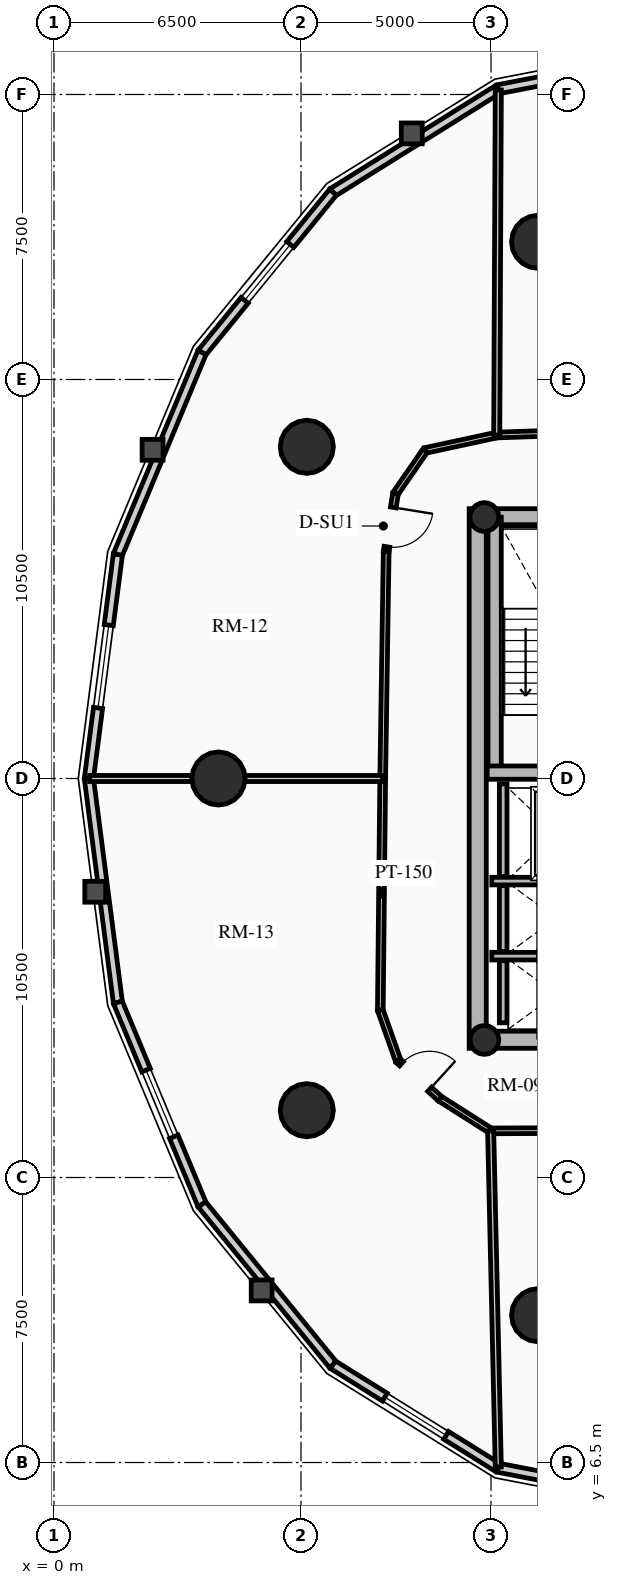
"""IFC4 building model, lengths in metres.
Left out: names, types, materials, properties, quantities, classifications, styles, units other than length and angle.
Written with IfcOpenShell. Run it as: python <this file> out.ifc"""

import sys

from ifc_helpers import new_model, si_unit, direction, frame, frame_2d, origin, origin_2d, place, context, subcontext, project, spatial, rectangle, circle, hollow_circle, extrude, source, transform, mapped, element, fill, save


model = new_model("IFC4")
c1 = context("Model", 3, precision=1e-05, world=origin(), true_north=direction((0.0, 1.0)))
c2 = subcontext(c1, "Body", "Model", "MODEL_VIEW")
j1 = project(units=[si_unit("LENGTHUNIT", "METRE"), si_unit("PLANEANGLEUNIT", "RADIAN")], contexts=[c1])
p1 = place(None, origin())
s1 = spatial("IfcSite", under=j1, at=p1, CompositionType="ELEMENT")
p2 = place(p1, origin())
s2 = spatial("IfcBuilding", under=s1, at=p2, CompositionType="ELEMENT")
p3 = place(p2, frame((0.0, 0.0, 132.88)))
s3 = spatial("IfcBuildingStorey", under=s2, at=p3, CompositionType="ELEMENT", Elevation=132.88)
p4 = place(p3, frame((11.15, 17.4, 0.0), z_axis=(0.0, 0.0, 1.0), x_axis=(0.0, 1.0, 0.0)))
e1 = element("IfcWall", 1, at=p4, inside=s3, PredefinedType="SHEAR", context=c2, shape_type="SweptSolid", body=[
    extrude(rectangle(XDim=14.2, YDim=0.45, at=frame_2d((7.1, 0.0))), origin(), (0.0, 0.0, 1.0), 3.72),
])
p5 = place(p3, frame((11.15, 17.625, 0.0), z_axis=(0.0, 0.0, 1.0), x_axis=(1.0, 0.0, 0.0)))
e2 = element("IfcWall", 2, at=p5, inside=s3, PredefinedType="SHEAR", context=c2, shape_type="SweptSolid", body=[
    extrude(rectangle(XDim=10.7, YDim=0.45, at=frame_2d((5.35, 0.0))), origin(), (0.0, 0.0, 1.0), 3.72),
])
m1 = source(origin(), c2, "Body", "SweptSolid", [
    extrude(rectangle(XDim=1.5, YDim=2.02, at=frame_2d((0.75, 1.01))), frame((0.0, 0.235, 0.0), z_axis=(0.0, -1.0, 0.0), x_axis=(1.0, 0.0, 0.0)), (0.0, 0.0, 1.0), 0.47),
])
p6 = place(p5, frame((5.45, 0.0, 0.0)))
e3 = element("IfcOpeningElement", 3, at=p6, cuts=e2, PredefinedType="OPENING", context=c2, shape_type="MappedRepresentation", body=[
    mapped(m1, transform((0.0, 0.0, 0.0), x_axis=(1.0, 0.0, 0.0), y_axis=(0.0, 1.0, 0.0), z_axis=(0.0, 0.0, 1.0), scale=1.0)),
])
p7 = place(p3, frame((11.15, 31.375, 0.0), z_axis=(0.0, 0.0, 1.0), x_axis=(1.0, 0.0, 0.0)))
e4 = element("IfcWall", 4, at=p7, inside=s3, PredefinedType="SHEAR", context=c2, shape_type="SweptSolid", body=[
    extrude(rectangle(XDim=10.7, YDim=0.45, at=frame_2d((5.35, 0.0))), origin(), (0.0, 0.0, 1.0), 3.72),
])
p8 = place(p7, frame((4.6, 0.0, 0.0)))
e5 = element("IfcOpeningElement", 5, at=p8, cuts=e4, PredefinedType="OPENING", context=c2, shape_type="MappedRepresentation", body=[
    mapped(m1, transform((0.0, 0.0, 0.0), x_axis=(1.0, 0.0, 0.0), y_axis=(0.0, 1.0, 0.0), z_axis=(0.0, 0.0, 1.0), scale=1.0)),
])
p9 = place(p3, frame((11.595, 24.655, 0.0), z_axis=(0.0, 0.0, 1.0), x_axis=(0.0, 1.0, 0.0)))
e6 = element("IfcWall", 6, at=p9, inside=s3, PredefinedType="SHEAR", context=c2, shape_type="SweptSolid", body=[
    extrude(rectangle(XDim=6.72, YDim=0.35, at=frame_2d((3.36, 0.0))), origin(), (0.0, 0.0, 1.0), 3.72),
])
p10 = place(p3, frame((11.4, 24.655, 0.0), z_axis=(0.0, 0.0, 1.0), x_axis=(1.0, 0.0, 0.0)))
e7 = element("IfcWall", 7, at=p10, inside=s3, PredefinedType="SHEAR", context=c2, shape_type="SweptSolid", body=[
    extrude(rectangle(XDim=3.285, YDim=0.35, at=frame_2d((1.643, 0.0))), origin(), (0.0, 0.0, 1.0), 3.72),
])
for number, where, z_axis, x_axis in (
    (8, (11.325, 17.62, 0.0), (0.0, 0.0, 1.0), (1.0, 0.0, 0.0)),
    (9, (11.325, 31.38, 0.0), (0.0, 0.0, 1.0), (1.0, 0.0, 0.0)),
):
    element("IfcColumn", number, at=place(p3, frame(where, z_axis=z_axis, x_axis=x_axis)), inside=s3, PredefinedType="COLUMN", context=c2, shape_type="SweptSolid", body=[
        extrude(hollow_circle(Radius=0.38, WallThickness=0.032, at=origin_2d()), origin(), (0.0, 0.0, 1.0), 3.72),
    ])
for number, where, z_axis, x_axis in (
    (10, (12.739, 38.623, 0.0), (0.0, 0.0, 1.0), (1.0, 0.0, 0.0)),
    (11, (6.653, 33.229, 0.0), (0.0, 0.0, 1.0), (1.0, 0.0, 0.0)),
    (12, (4.328, 24.5, 0.0), (0.0, 0.0, 1.0), (1.0, 0.0, 0.0)),
    (13, (6.653, 15.771, 0.0), (0.0, 0.0, 1.0), (1.0, 0.0, 0.0)),
    (14, (12.739, 10.377, 0.0), (0.0, 0.0, 1.0), (1.0, 0.0, 0.0)),
):
    element("IfcColumn", number, at=place(p3, frame(where, z_axis=z_axis, x_axis=x_axis)), inside=s3, PredefinedType="USERDEFINED", context=c2, shape_type="SweptSolid", body=[
        extrude(circle(Radius=0.7, at=origin_2d()), origin(), (0.0, 0.0, 1.0), 3.72),
    ])
p11 = place(p3, frame((11.685, 42.637, 0.0), z_axis=(0.0, 0.0, 1.0), x_axis=(0.981723785992, 0.190311344954, 0.0)))
e15 = element("IfcWall", 15, at=p11, inside=s3, PredefinedType="SOLIDWALL", context=c2, shape_type="SweptSolid", body=[
    extrude(rectangle(XDim=4.904, YDim=0.24, at=frame_2d((2.452, 0.0))), origin(), (0.0, 0.0, 1.0), 2.949),
])
m2 = source(origin(), c2, "Body", "SweptSolid", [
    extrude(rectangle(XDim=1.9, YDim=1.35, at=frame_2d((0.95, 0.675))), frame((0.0, 0.13, 0.0), z_axis=(0.0, -1.0, 0.0), x_axis=(1.0, 0.0, 0.0)), (0.0, 0.0, 1.0), 0.26),
])
p12 = place(p11, frame((1.502, 0.0, 0.65)))
e16 = element("IfcOpeningElement", 16, at=p12, cuts=e15, PredefinedType="OPENING", context=c2, shape_type="MappedRepresentation", body=[
    mapped(m2, transform((0.0, 0.0, 0.0), x_axis=(1.0, 0.0, 0.0), y_axis=(0.0, 1.0, 0.0), z_axis=(0.0, 0.0, 1.0), scale=1.0)),
])
p13 = place(p3, frame((7.342, 39.928, 0.0), z_axis=(0.0, 0.0, 1.0), x_axis=(0.848520380187, 0.529162701263, 0.0)))
e17 = element("IfcWall", 17, at=p13, inside=s3, PredefinedType="SOLIDWALL", context=c2, shape_type="SweptSolid", body=[
    extrude(rectangle(XDim=5.119, YDim=0.24, at=frame_2d((2.56, 0.0))), origin(), (0.0, 0.0, 1.0), 2.949),
])
p14 = place(p3, frame((3.895, 35.709, 0.0), z_axis=(0.0, 0.0, 1.0), x_axis=(0.632700781152, 0.77439635945, 0.0)))
e18 = element("IfcWall", 18, at=p14, inside=s3, PredefinedType="SOLIDWALL", context=c2, shape_type="SweptSolid", body=[
    extrude(rectangle(XDim=5.448, YDim=0.24, at=frame_2d((2.724, 0.0))), origin(), (0.0, 0.0, 1.0), 2.949),
])
p15 = place(p14, frame((1.774, 0.0, 0.65)))
e19 = element("IfcOpeningElement", 19, at=p15, cuts=e18, PredefinedType="OPENING", context=c2, shape_type="MappedRepresentation", body=[
    mapped(m2, transform((0.0, 0.0, 0.0), x_axis=(1.0, 0.0, 0.0), y_axis=(0.0, 1.0, 0.0), z_axis=(0.0, 0.0, 1.0), scale=1.0)),
])
p16 = place(p3, frame((1.682, 30.393, 0.0), z_axis=(0.0, 0.0, 1.0), x_axis=(0.384344417632, 0.923189779317, 0.0)))
e20 = element("IfcWall", 20, at=p16, inside=s3, PredefinedType="SOLIDWALL", context=c2, shape_type="SweptSolid", body=[
    extrude(rectangle(XDim=5.758, YDim=0.24, at=frame_2d((2.879, 0.0))), origin(), (0.0, 0.0, 1.0), 2.949),
])
p17 = place(p3, frame((0.919, 24.5, 0.0), z_axis=(0.0, 0.0, 1.0), x_axis=(0.128351991996, 0.991728675672, 0.0)))
e21 = element("IfcWall", 21, at=p17, inside=s3, PredefinedType="SOLIDWALL", context=c2, shape_type="SweptSolid", body=[
    extrude(rectangle(XDim=5.942, YDim=0.24, at=frame_2d((2.971, 0.0))), origin(), (0.0, 0.0, 1.0), 2.949),
])
m3 = source(origin(), c2, "Body", "SweptSolid", [
    extrude(rectangle(XDim=2.2, YDim=1.35, at=frame_2d((1.1, 0.675))), frame((0.0, 0.13, 0.0), z_axis=(0.0, -1.0, 0.0), x_axis=(1.0, 0.0, 0.0)), (0.0, 0.0, 1.0), 0.26),
])
p18 = place(p17, frame((1.871, 0.0, 0.65)))
e22 = element("IfcOpeningElement", 22, at=p18, cuts=e21, PredefinedType="OPENING", context=c2, shape_type="MappedRepresentation", body=[
    mapped(m3, transform((0.0, 0.0, 0.0), x_axis=(1.0, 0.0, 0.0), y_axis=(0.0, 1.0, 0.0), z_axis=(0.0, 0.0, 1.0), scale=1.0)),
])
p19 = place(p3, frame((1.682, 18.607, 0.0), z_axis=(0.0, 0.0, 1.0), x_axis=(-0.128351991996, 0.991728675672, 0.0)))
e23 = element("IfcWall", 23, at=p19, inside=s3, PredefinedType="SOLIDWALL", context=c2, shape_type="SweptSolid", body=[
    extrude(rectangle(XDim=5.942, YDim=0.24, at=frame_2d((2.971, 0.0))), origin(), (0.0, 0.0, 1.0), 2.949),
])
p20 = place(p3, frame((3.895, 13.291, 0.0), z_axis=(0.0, 0.0, 1.0), x_axis=(-0.384344417632, 0.923189779317, 0.0)))
e24 = element("IfcWall", 24, at=p20, inside=s3, PredefinedType="SOLIDWALL", context=c2, shape_type="SweptSolid", body=[
    extrude(rectangle(XDim=5.758, YDim=0.24, at=frame_2d((2.879, 0.0))), origin(), (0.0, 0.0, 1.0), 2.949),
])
p21 = place(p20, frame((1.929, 0.0, 0.65)))
e25 = element("IfcOpeningElement", 25, at=p21, cuts=e24, PredefinedType="OPENING", context=c2, shape_type="MappedRepresentation", body=[
    mapped(m2, transform((0.0, 0.0, 0.0), x_axis=(1.0, 0.0, 0.0), y_axis=(0.0, 1.0, 0.0), z_axis=(0.0, 0.0, 1.0), scale=1.0)),
])
p22 = place(p3, frame((7.342, 9.072, 0.0), z_axis=(0.0, 0.0, 1.0), x_axis=(-0.632700781152, 0.77439635945, 0.0)))
e26 = element("IfcWall", 26, at=p22, inside=s3, PredefinedType="SOLIDWALL", context=c2, shape_type="SweptSolid", body=[
    extrude(rectangle(XDim=5.448, YDim=0.24, at=frame_2d((2.724, 0.0))), origin(), (0.0, 0.0, 1.0), 2.949),
])
p23 = place(p3, frame((11.685, 6.363, 0.0), z_axis=(0.0, 0.0, 1.0), x_axis=(-0.848520380187, 0.529162701263, 0.0)))
e27 = element("IfcWall", 27, at=p23, inside=s3, PredefinedType="SOLIDWALL", context=c2, shape_type="SweptSolid", body=[
    extrude(rectangle(XDim=5.119, YDim=0.24, at=frame_2d((2.56, 0.0))), origin(), (0.0, 0.0, 1.0), 2.949),
])
p24 = place(p23, frame((1.609, 0.0, 0.65)))
e28 = element("IfcOpeningElement", 28, at=p24, cuts=e27, PredefinedType="OPENING", context=c2, shape_type="MappedRepresentation", body=[
    mapped(m2, transform((0.0, 0.0, 0.0), x_axis=(1.0, 0.0, 0.0), y_axis=(0.0, 1.0, 0.0), z_axis=(0.0, 0.0, 1.0), scale=1.0)),
])
p25 = place(p3, frame((16.5, 5.43, 0.0), z_axis=(0.0, 0.0, 1.0), x_axis=(-0.981723785992, 0.190311344954, 0.0)))
e29 = element("IfcWall", 29, at=p25, inside=s3, PredefinedType="SOLIDWALL", context=c2, shape_type="SweptSolid", body=[
    extrude(rectangle(XDim=4.904, YDim=0.24, at=frame_2d((2.452, 0.0))), origin(), (0.0, 0.0, 1.0), 2.949),
])
p26 = place(p25, frame((1.502, 0.0, 0.65)))
e30 = element("IfcOpeningElement", 30, at=p26, cuts=e29, PredefinedType="OPENING", context=c2, shape_type="MappedRepresentation", body=[
    mapped(m2, transform((0.0, 0.0, 0.0), x_axis=(1.0, 0.0, 0.0), y_axis=(0.0, 1.0, 0.0), z_axis=(0.0, 0.0, 1.0), scale=1.0)),
])
p27 = place(p3, frame((11.52, 21.8, 0.0), z_axis=(0.0, 0.0, 1.0), x_axis=(1.0, 0.0, 0.0)))
e31 = element("IfcWall", 31, at=p27, inside=s3, PredefinedType="SHEAR", context=c2, shape_type="SweptSolid", body=[
    extrude(rectangle(XDim=2.97, YDim=0.2, at=frame_2d((1.485, 0.0))), origin(), (0.0, 0.0, 1.0), 3.72),
])
p28 = place(p3, frame((11.82, 21.92, 0.0), z_axis=(0.0, 0.0, 1.0), x_axis=(0.0, 1.0, 0.0)))
e32 = element("IfcWall", 32, at=p28, inside=s3, PredefinedType="SHEAR", context=c2, shape_type="SweptSolid", body=[
    extrude(rectangle(XDim=2.44, YDim=0.2, at=frame_2d((1.22, 0.0))), origin(), (0.0, 0.0, 1.0), 3.72),
])
p29 = place(p3, frame((11.52, 19.825, 0.0), z_axis=(0.0, 0.0, 1.0), x_axis=(1.0, 0.0, 0.0)))
e33 = element("IfcWall", 33, at=p29, inside=s3, PredefinedType="SHEAR", context=c2, shape_type="SweptSolid", body=[
    extrude(rectangle(XDim=2.97, YDim=0.2, at=frame_2d((1.485, 0.0))), origin(), (0.0, 0.0, 1.0), 3.72),
])
p30 = place(p3, frame((11.82, 19.945, 0.0), z_axis=(0.0, 0.0, 1.0), x_axis=(0.0, 1.0, 0.0)))
e34 = element("IfcWall", 34, at=p30, inside=s3, PredefinedType="SHEAR", context=c2, shape_type="SweptSolid", body=[
    extrude(rectangle(XDim=1.735, YDim=0.2, at=frame_2d((0.867, 0.0))), origin(), (0.0, 0.0, 1.0), 3.72),
])
p31 = place(p3, frame((11.82, 18.07, 0.0), z_axis=(0.0, 0.0, 1.0), x_axis=(0.0, 1.0, 0.0)))
e35 = element("IfcWall", 35, at=p31, inside=s3, PredefinedType="SHEAR", context=c2, shape_type="SweptSolid", body=[
    extrude(rectangle(XDim=1.635, YDim=0.2, at=frame_2d((0.817, 0.0))), origin(), (0.0, 0.0, 1.0), 3.72),
])
p32 = place(p3, frame((18.133, 33.76, 0.0), z_axis=(0.0, 0.0, 1.0), x_axis=(-0.999419643988, -0.034064280574, 0.0)))
e36 = element("IfcWall", 36, at=p32, inside=s3, PredefinedType="PARTITIONING", context=c2, shape_type="SweptSolid", body=[
    extrude(rectangle(XDim=6.486, YDim=0.15, at=frame_2d((3.243, 0.0))), origin(), (0.0, 0.0, 1.0), 2.995),
])
p33 = place(p3, frame((11.65, 33.539, 0.0), z_axis=(0.0, 0.0, 1.0), x_axis=(-0.977535921581, -0.210768882949, 0.0)))
e37 = element("IfcWall", 37, at=p33, inside=s3, PredefinedType="PARTITIONING", context=c2, shape_type="SweptSolid", body=[
    extrude(rectangle(XDim=1.923, YDim=0.15, at=frame_2d((0.961, 0.0))), origin(), (0.0, 0.0, 1.0), 2.995),
])
p34 = place(p3, frame((9.771, 33.133, 0.0), z_axis=(0.0, 0.0, 1.0), x_axis=(-0.568464531016, -0.822707771312, 0.0)))
e38 = element("IfcWall", 38, at=p34, inside=s3, PredefinedType="PARTITIONING", context=c2, shape_type="SweptSolid", body=[
    extrude(rectangle(XDim=1.38, YDim=0.15, at=frame_2d((0.69, 0.0))), origin(), (0.0, 0.0, 1.0), 2.995),
])
p35 = place(p3, frame((8.986, 31.998, 0.0), z_axis=(0.0, 0.0, 1.0), x_axis=(-0.158992972351, -0.98727971454, 0.0)))
e39 = element("IfcWall", 39, at=p35, inside=s3, PredefinedType="PARTITIONING", context=c2, shape_type="SweptSolid", body=[
    extrude(rectangle(XDim=1.539, YDim=0.15, at=frame_2d((0.769, 0.0))), origin(), (0.0, 0.0, 1.0), 2.995),
])
m4 = source(origin(), c2, "Body", "SweptSolid", [
    extrude(rectangle(XDim=1.05, YDim=2.015, at=frame_2d((0.525, 1.007))), frame((0.0, 0.085, 0.0), z_axis=(0.0, -1.0, 0.0), x_axis=(1.0, 0.0, 0.0)), (0.0, 0.0, 1.0), 0.17),
])
p36 = place(p35, frame((0.369, 0.0, 0.0)))
e40 = element("IfcOpeningElement", 40, at=p36, cuts=e39, PredefinedType="OPENING", context=c2, shape_type="MappedRepresentation", body=[
    mapped(m4, transform((0.0, 0.0, 0.0), x_axis=(1.0, 0.0, 0.0), y_axis=(0.0, 1.0, 0.0), z_axis=(0.0, 0.0, 1.0), scale=1.0)),
])
p37 = place(p3, frame((8.742, 30.479, 0.0), z_axis=(0.0, 0.0, 1.0), x_axis=(-0.015351396174, -0.999882160375, 0.0)))
e41 = element("IfcWall", 41, at=p37, inside=s3, PredefinedType="PARTITIONING", context=c2, shape_type="SweptSolid", body=[
    extrude(rectangle(XDim=5.98, YDim=0.15, at=frame_2d((2.99, 0.0))), origin(), (0.0, 0.0, 1.0), 3.425),
])
p38 = place(p3, frame((8.65, 24.5, 0.0), z_axis=(0.0, 0.0, 1.0), x_axis=(-0.010250943023, -0.999947457703, 0.0)))
e42 = element("IfcWall", 42, at=p38, inside=s3, PredefinedType="PARTITIONING", context=c2, shape_type="SweptSolid", body=[
    extrude(rectangle(XDim=6.097, YDim=0.15, at=frame_2d((3.048, 0.0))), origin(), (0.0, 0.0, 1.0), 2.995),
])
p39 = place(p3, frame((8.587, 18.403, 0.0), z_axis=(0.0, 0.0, 1.0), x_axis=(0.333119120686, -0.942884749815, 0.0)))
e43 = element("IfcWall", 43, at=p39, inside=s3, PredefinedType="PARTITIONING", context=c2, shape_type="SweptSolid", body=[
    extrude(rectangle(XDim=1.409, YDim=0.15, at=frame_2d((0.705, 0.0))), origin(), (0.0, 0.0, 1.0), 2.995),
])
p40 = place(p3, frame((9.057, 17.074, 0.0), z_axis=(0.0, 0.0, 1.0), x_axis=(0.739999571423, -0.672607340351, 0.0)))
e44 = element("IfcWall", 44, at=p40, inside=s3, PredefinedType="PARTITIONING", context=c2, shape_type="SweptSolid", body=[
    extrude(rectangle(XDim=1.485, YDim=0.15, at=frame_2d((0.743, 0.0))), origin(), (0.0, 0.0, 1.0), 2.995),
])
m5 = source(origin(), c2, "Body", "SweptSolid", [
    extrude(rectangle(XDim=1.0, YDim=2.015, at=frame_2d((0.5, 1.007))), frame((0.0, 0.085, 0.0), z_axis=(0.0, -1.0, 0.0), x_axis=(1.0, 0.0, 0.0)), (0.0, 0.0, 1.0), 0.17),
])
p41 = place(p40, frame((0.12, 0.0, 0.0)))
e45 = element("IfcOpeningElement", 45, at=p41, cuts=e44, PredefinedType="OPENING", context=c2, shape_type="MappedRepresentation", body=[
    mapped(m5, transform((0.0, 0.0, 0.0), x_axis=(1.0, 0.0, 0.0), y_axis=(0.0, 1.0, 0.0), z_axis=(0.0, 0.0, 1.0), scale=1.0)),
])
p42 = place(p3, frame((10.156, 16.075, 0.0), z_axis=(0.0, 0.0, 1.0), x_axis=(0.843896624713, -0.536505812455, 0.0)))
e46 = element("IfcWall", 46, at=p42, inside=s3, PredefinedType="PARTITIONING", context=c2, shape_type="SweptSolid", body=[
    extrude(rectangle(XDim=1.581, YDim=0.15, at=frame_2d((0.791, 0.0))), origin(), (0.0, 0.0, 1.0), 2.995),
])
p43 = place(p3, frame((11.49, 15.227, 0.0), z_axis=(0.0, 0.0, 1.0), x_axis=(0.999991728046, 0.004067411998, 0.0)))
e47 = element("IfcWall", 47, at=p43, inside=s3, PredefinedType="PARTITIONING", context=c2, shape_type="SweptSolid", body=[
    extrude(rectangle(XDim=3.301, YDim=0.15, at=frame_2d((1.651, 0.0))), origin(), (0.0, 0.0, 1.0), 2.995),
])
p44 = place(p3, frame((11.65, 33.539, 0.0), z_axis=(0.0, 0.0, 1.0), x_axis=(0.00451754022, 0.999989795863, 0.0)))
e48 = element("IfcWall", 48, at=p44, inside=s3, PredefinedType="PARTITIONING", context=c2, shape_type="SweptSolid", body=[
    extrude(rectangle(XDim=9.079, YDim=0.16, at=frame_2d((4.54, 0.0))), origin(), (0.0, 0.0, 1.0), 2.949),
])
p45 = place(p3, frame((8.65, 24.5, 0.0), z_axis=(0.0, 0.0, 1.0), x_axis=(-1.0, 0.0, 0.0)))
e49 = element("IfcWall", 49, at=p45, inside=s3, PredefinedType="PARTITIONING", context=c2, shape_type="SweptSolid", body=[
    extrude(rectangle(XDim=7.711, YDim=0.16, at=frame_2d((3.855, 0.0))), origin(), (0.0, 0.0, 1.0), 2.949),
])
p46 = place(p3, frame((11.49, 15.227, 0.0), z_axis=(0.0, 0.0, 1.0), x_axis=(0.022711375682, -0.999742063442, 0.0)))
e50 = element("IfcWall", 50, at=p46, inside=s3, PredefinedType="PARTITIONING", context=c2, shape_type="SweptSolid", body=[
    extrude(rectangle(XDim=8.847, YDim=0.16, at=frame_2d((4.423, 0.0))), origin(), (0.0, 0.0, 1.0), 2.949),
])
m6 = source(origin(), c2, "Body", "SweptSolid", [
    extrude(rectangle(XDim=1.9, YDim=1.35, at=frame_2d((0.95, 0.675))), frame((0.0, 0.03, 0.0), z_axis=(0.0, -1.0, 0.0), x_axis=(1.0, 0.0, 0.0)), (0.0, 0.0, 1.0), 0.06),
])
p47 = place(p15, origin())
e51 = element("IfcWindow", 51, at=p47, inside=s3, PartitioningType="DOUBLE_PANEL_VERTICAL", PredefinedType="WINDOW", context=c2, shape_type="MappedRepresentation", body=[
    mapped(m6, transform((0.0, 0.0, 0.0), x_axis=(1.0, 0.0, 0.0), y_axis=(0.0, 1.0, 0.0), z_axis=(0.0, 0.0, 1.0), scale=1.0)),
])
fill(e19, e51)
m7 = source(origin(), c2, "Body", "SweptSolid", [
    extrude(rectangle(XDim=2.2, YDim=1.35, at=frame_2d((1.1, 0.675))), frame((0.0, 0.03, 0.0), z_axis=(0.0, -1.0, 0.0), x_axis=(1.0, 0.0, 0.0)), (0.0, 0.0, 1.0), 0.06),
])
p48 = place(p18, origin())
e52 = element("IfcWindow", 52, at=p48, inside=s3, PartitioningType="DOUBLE_PANEL_VERTICAL", PredefinedType="WINDOW", context=c2, shape_type="MappedRepresentation", body=[
    mapped(m7, transform((0.0, 0.0, 0.0), x_axis=(1.0, 0.0, 0.0), y_axis=(0.0, 1.0, 0.0), z_axis=(0.0, 0.0, 1.0), scale=1.0)),
])
fill(e22, e52)
p49 = place(p21, origin())
e53 = element("IfcWindow", 53, at=p49, inside=s3, PartitioningType="DOUBLE_PANEL_VERTICAL", PredefinedType="WINDOW", context=c2, shape_type="MappedRepresentation", body=[
    mapped(m6, transform((0.0, 0.0, 0.0), x_axis=(1.0, 0.0, 0.0), y_axis=(0.0, 1.0, 0.0), z_axis=(0.0, 0.0, 1.0), scale=1.0)),
])
fill(e25, e53)
p50 = place(p24, origin())
e54 = element("IfcWindow", 54, at=p50, inside=s3, PartitioningType="DOUBLE_PANEL_VERTICAL", PredefinedType="WINDOW", context=c2, shape_type="MappedRepresentation", body=[
    mapped(m6, transform((0.0, 0.0, 0.0), x_axis=(1.0, 0.0, 0.0), y_axis=(0.0, 1.0, 0.0), z_axis=(0.0, 0.0, 1.0), scale=1.0)),
])
fill(e28, e54)
m8 = source(origin(), c2, "Body", "SweptSolid", [
    extrude(rectangle(XDim=1.05, YDim=2.015, at=frame_2d((0.525, 1.007))), frame((0.0, 0.025, 0.0), z_axis=(0.0, -1.0, 0.0), x_axis=(1.0, 0.0, 0.0)), (0.0, 0.0, 1.0), 0.05),
])
p51 = place(p36, origin())
e55 = element("IfcDoor", 55, at=p51, inside=s3, OperationType="SINGLE_SWING_LEFT", PredefinedType="DOOR", context=c2, shape_type="MappedRepresentation", body=[
    mapped(m8, transform((0.0, 0.0, 0.0), x_axis=(1.0, 0.0, 0.0), y_axis=(0.0, 1.0, 0.0), z_axis=(0.0, 0.0, 1.0), scale=1.0)),
])
fill(e40, e55)
m9 = source(origin(), c2, "Body", "SweptSolid", [
    extrude(rectangle(XDim=1.0, YDim=2.015, at=frame_2d((0.5, 1.007))), frame((0.0, 0.025, 0.0), z_axis=(0.0, -1.0, 0.0), x_axis=(1.0, 0.0, 0.0)), (0.0, 0.0, 1.0), 0.05),
])
p52 = place(p41, origin())
e56 = element("IfcDoor", 56, at=p52, inside=s3, OperationType="SINGLE_SWING_RIGHT", PredefinedType="DOOR", context=c2, shape_type="MappedRepresentation", body=[
    mapped(m9, transform((0.0, 0.0, 0.0), x_axis=(1.0, 0.0, 0.0), y_axis=(0.0, 1.0, 0.0), z_axis=(0.0, 0.0, 1.0), scale=1.0)),
])
fill(e45, e56)
save(model, sys.argv[1])
